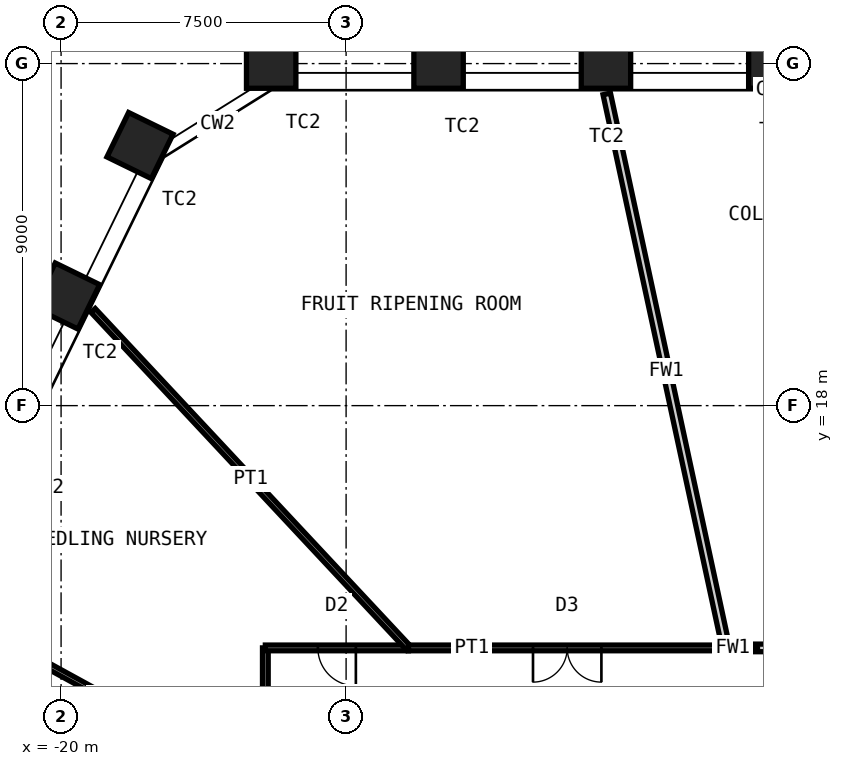
"""IFC4 building model, lengths in metres.
Left out: names, types, materials, properties, quantities, classifications, styles, units other than length and angle.
Written with IfcOpenShell. Run it as: python <this file> out.ifc"""

import sys

from ifc_helpers import new_model, si_unit, direction, frame, frame_2d, origin, origin_2d, place, context, subcontext, project, spatial, rectangle, hollow_rectangle, extrude, element, fill, save


model = new_model("IFC4")
c1 = context("Model", 3, precision=1e-05, world=origin(), true_north=direction((0.0, 1.0)))
c2 = subcontext(c1, "Body", "Model", "MODEL_VIEW")
j1 = project(units=[si_unit("LENGTHUNIT", "METRE"), si_unit("PLANEANGLEUNIT", "RADIAN")], contexts=[c1])
p1 = place(None, origin())
s1 = spatial("IfcSite", under=j1, at=p1, CompositionType="ELEMENT")
p2 = place(p1, origin())
s2 = spatial("IfcBuilding", under=s1, at=p2, CompositionType="ELEMENT")
p3 = place(p2, frame((0.0, 0.0, 72.0)))
s3 = spatial("IfcBuildingStorey", under=s2, at=p3, CompositionType="ELEMENT", Elevation=72.0)
for number, where, z_axis, x_axis in (
    (1, (-14.471, 27.0, 0.0), (0.0, 0.0, 1.0), (-1.0, 0.0, 0.0)),
    (2, (-10.067, 27.0, 0.0), (0.0, 0.0, 1.0), (-1.0, 0.0, 0.0)),
    (3, (-5.662, 27.0, 0.0), (0.0, 0.0, 1.0), (-1.0, 0.0, 0.0)),
    (4, (-1.258, 27.0, 0.0), (0.0, 0.0, 1.0), (-1.0, 0.0, 0.0)),
    (5, (-19.854, 20.884, 0.0), (0.0, 0.0, 1.0), (-0.438, -0.899, 0.0)),
    (6, (-17.924, 24.843, 0.0), (0.0, 0.0, 1.0), (-0.438, -0.899, 0.0)),
):
    element("IfcColumn", number, at=place(p3, frame(where, z_axis=z_axis, x_axis=x_axis)), inside=s3, PredefinedType="COLUMN", context=c2, shape_type="SweptSolid", body=[
        extrude(hollow_rectangle(XDim=1.3, YDim=1.3, WallThickness=0.1, at=origin_2d()), origin(), (0.0, 0.0, 1.0), 5.0),
    ])
p4 = place(p3, frame((-22.999, 12.612, 0.0), z_axis=(0.0, 0.0, 1.0), x_axis=(0.876825619135, -0.480808520752, 0.0)))
e7 = element("IfcWall", 7, at=p4, inside=s3, PredefinedType="PARTITIONING", context=c2, shape_type="SweptSolid", body=[
    extrude(rectangle(XDim=9.551, YDim=0.15, at=frame_2d((4.775, 0.0))), origin(), (0.0, 0.0, 1.0), 3.7),
])
p5 = place(p3, frame((-14.625, 8.02, 0.0), z_axis=(0.0, 0.0, 1.0), x_axis=(0.0, 1.0, 0.0)))
e8 = element("IfcWall", 8, at=p5, inside=s3, PredefinedType="PARTITIONING", context=c2, shape_type="SweptSolid", body=[
    extrude(rectangle(XDim=3.605, YDim=0.15, at=frame_2d((1.803, 0.0))), origin(), (0.0, 0.0, 1.0), 4.8),
])
p6 = place(p3, frame((-14.625, 11.625, 0.0), z_axis=(0.0, 0.0, 1.0), x_axis=(1.0, 0.0, 0.0)))
e9 = element("IfcWall", 9, at=p6, inside=s3, PredefinedType="PARTITIONING", context=c2, shape_type="SweptSolid", body=[
    extrude(rectangle(XDim=3.764, YDim=0.15, at=frame_2d((1.882, 0.0))), origin(), (0.0, 0.0, 1.0), 4.8),
])
p7 = place(p6, frame((1.382, 0.0, 0.0)))
e10 = element("IfcOpeningElement", 10, at=p7, cuts=e9, PredefinedType="OPENING", context=c2, shape_type="SweptSolid", body=[
    extrude(rectangle(XDim=1.0, YDim=2.4, at=frame_2d((0.5, 1.2))), frame((0.0, 0.085, 0.0), z_axis=(0.0, -1.0, 0.0), x_axis=(1.0, 0.0, 0.0)), (0.0, 0.0, 1.0), 0.17),
])
p8 = place(p3, frame((-19.157, 20.504, 0.0), z_axis=(0.0, 0.0, 1.0), x_axis=(0.682689688298, -0.73070841619, 0.0)))
e11 = element("IfcWall", 11, at=p8, inside=s3, PredefinedType="PARTITIONING", context=c2, shape_type="SweptSolid", body=[
    extrude(rectangle(XDim=12.151, YDim=0.15, at=frame_2d((6.076, 0.0))), origin(), (0.0, 0.0, 1.0), 3.7),
])
p9 = place(p3, frame((-10.861, 11.625, 0.0), z_axis=(0.0, 0.0, 1.0), x_axis=(1.0, 0.0, 0.0)))
e12 = element("IfcWall", 12, at=p9, inside=s3, PredefinedType="PARTITIONING", context=c2, shape_type="SweptSolid", body=[
    extrude(rectangle(XDim=8.359, YDim=0.15, at=frame_2d((4.179, 0.0))), origin(), (0.0, 0.0, 1.0), 4.8),
])
p10 = place(p9, frame((3.279, 0.0, 0.0)))
e13 = element("IfcOpeningElement", 13, at=p10, cuts=e12, PredefinedType="OPENING", context=c2, shape_type="SweptSolid", body=[
    extrude(rectangle(XDim=1.8, YDim=2.4, at=frame_2d((0.9, 1.2))), frame((0.0, 0.085, 0.0), z_axis=(0.0, -1.0, 0.0), x_axis=(1.0, 0.0, 0.0)), (0.0, 0.0, 1.0), 0.17),
])
p11 = place(p3, frame((-5.641, 26.202, 0.0), z_axis=(0.0, 0.0, 1.0), x_axis=(0.210474950898, -0.977599250738, 0.0)))
e14 = element("IfcWall", 14, at=p11, inside=s3, PredefinedType="PARTITIONING", context=c2, shape_type="SweptSolid", body=[
    extrude(rectangle(XDim=14.911, YDim=0.2, at=frame_2d((7.456, 0.0))), origin(), (0.0, 0.0, 1.0), 3.7),
])
p12 = place(p3, frame((-2.503, 11.625, 0.0), z_axis=(0.0, 0.0, 1.0), x_axis=(1.0, 0.0, 0.0)))
e15 = element("IfcWall", 15, at=p12, inside=s3, PredefinedType="PARTITIONING", context=c2, shape_type="SweptSolid", body=[
    extrude(rectangle(XDim=3.894, YDim=0.2, at=frame_2d((1.947, 0.0))), origin(), (0.0, 0.0, 1.0), 4.8),
])
p13 = place(p12, frame((1.397, 0.0, 0.0)))
e16 = element("IfcOpeningElement", 16, at=p13, cuts=e15, PredefinedType="OPENING", context=c2, shape_type="SweptSolid", body=[
    extrude(rectangle(XDim=1.1, YDim=2.1, at=frame_2d((0.55, 1.05))), frame((0.0, 0.11, 0.0), z_axis=(0.0, -1.0, 0.0), x_axis=(1.0, 0.0, 0.0)), (0.0, 0.0, 1.0), 0.22),
])
p14 = place(p7, origin())
e17 = element("IfcDoor", 17, at=p14, inside=s3, OperationType="SINGLE_SWING_RIGHT", PredefinedType="DOOR", context=c2, shape_type="SweptSolid", body=[
    extrude(rectangle(XDim=1.0, YDim=2.4, at=frame_2d((0.5, 1.2))), frame((0.0, 0.025, 0.0), z_axis=(0.0, -1.0, 0.0), x_axis=(1.0, 0.0, 0.0)), (0.0, 0.0, 1.0), 0.05),
])
fill(e10, e17)
p15 = place(p10, origin())
e18 = element("IfcDoor", 18, at=p15, inside=s3, OperationType="DOUBLE_DOOR_DOUBLE_SWING", PredefinedType="DOOR", context=c2, shape_type="SweptSolid", body=[
    extrude(rectangle(XDim=1.8, YDim=2.4, at=frame_2d((0.9, 1.2))), frame((0.0, 0.025, 0.0), z_axis=(0.0, -1.0, 0.0), x_axis=(1.0, 0.0, 0.0)), (0.0, 0.0, 1.0), 0.05),
])
fill(e13, e18)
save(model, sys.argv[1])
